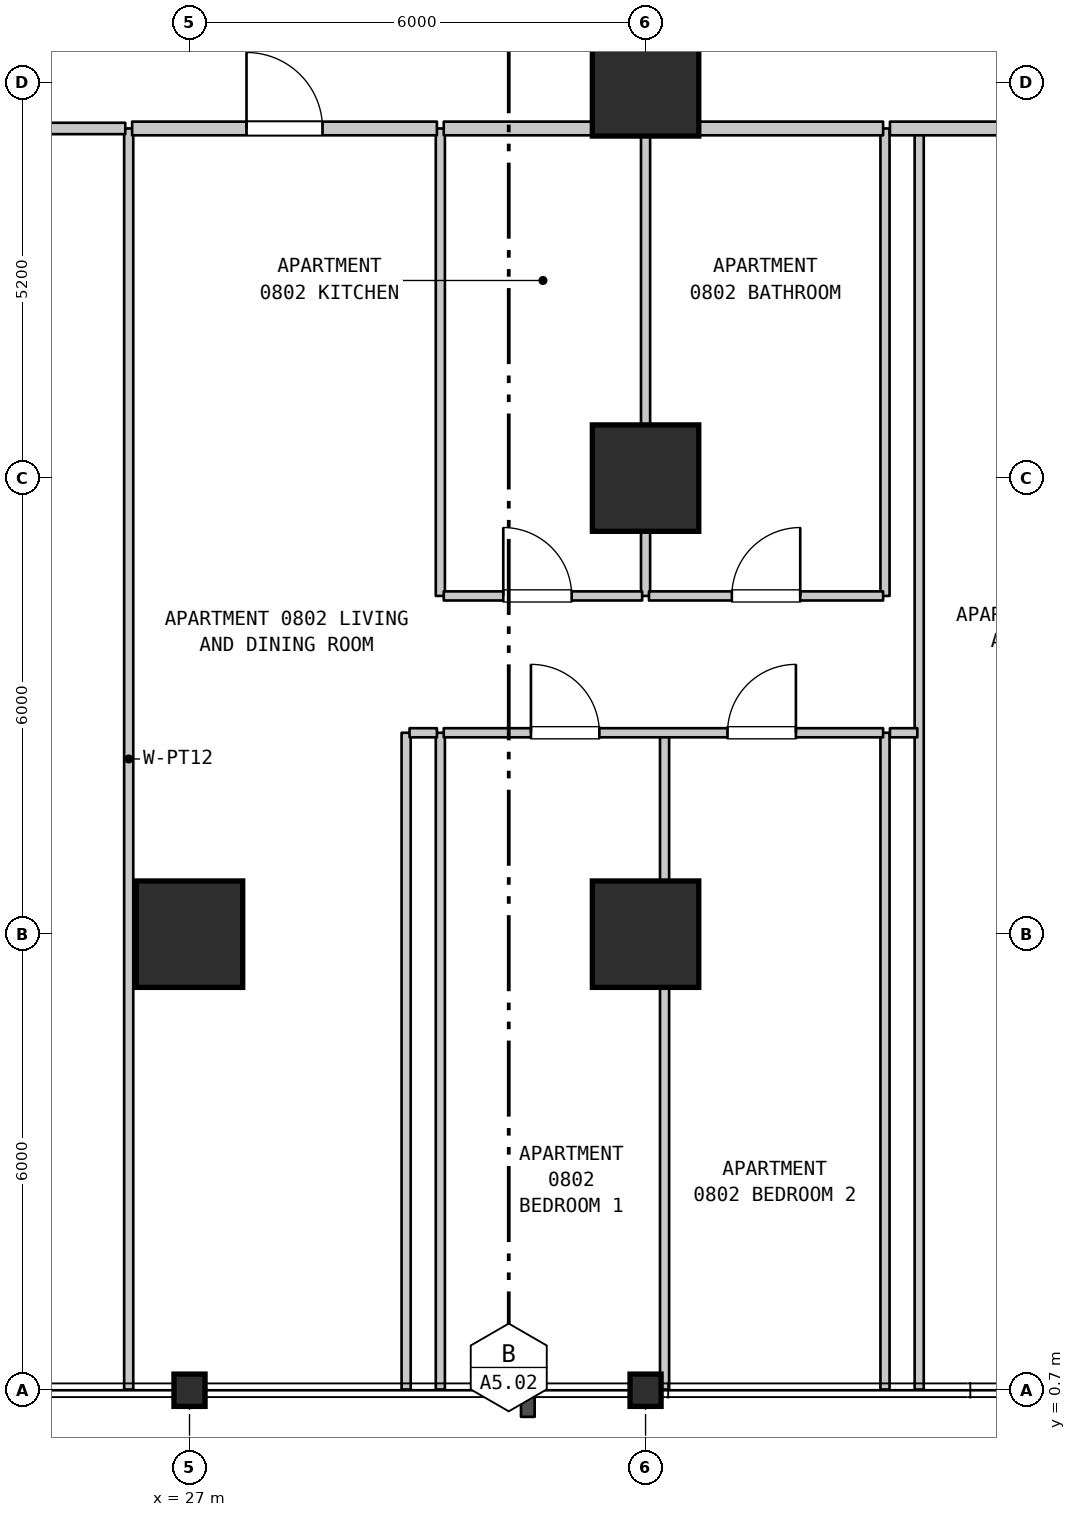
"""IFC4 building model, lengths in metres.
Left out: names, types, materials, properties, quantities, classifications, styles, units other than length and angle.
Written with IfcOpenShell. Run it as: python <this file> out.ifc"""

import sys

from ifc_helpers import new_model, si_unit, direction, frame, frame_2d, origin, origin_2d, place, context, subcontext, project, spatial, rectangle, i_section, extrude, element, fill, save


model = new_model("IFC4")
c1 = context("Model", 3, precision=1e-05, world=origin(), true_north=direction((0.0, 1.0)))
c2 = subcontext(c1, "Body", "Model", "MODEL_VIEW")
j1 = project(units=[si_unit("LENGTHUNIT", "METRE"), si_unit("PLANEANGLEUNIT", "RADIAN")], contexts=[c1])
p1 = place(None, origin())
s1 = spatial("IfcSite", under=j1, at=p1, CompositionType="ELEMENT")
p2 = place(p1, origin())
s2 = spatial("IfcBuilding", under=s1, at=p2, CompositionType="ELEMENT")
p3 = place(p2, frame((0.0, 0.0, 38.8)))
s3 = spatial("IfcBuildingStorey", under=s2, at=p3, CompositionType="ELEMENT", Elevation=38.8)
p4 = place(p3, frame((27.0, 0.7, 0.0), z_axis=(0.0, 0.0, 1.0), x_axis=(1.0, 0.0, 0.0)))
e1 = element("IfcColumn", 1, at=p4, inside=s3, PredefinedType="COLUMN", context=c2, shape_type="SweptSolid", body=[
    extrude(i_section(OverallWidth=0.409, OverallDepth=0.425, WebThickness=0.032, FlangeThickness=0.052, FilletRadius=0.015, at=origin_2d()), origin(), (0.0, 0.0, 1.0), 3.7),
])
p5 = place(p3, frame((27.0, 6.7, 0.0), z_axis=(0.0, 0.0, 1.0), x_axis=(1.0, 0.0, 0.0)))
e2 = element("IfcColumn", 2, at=p5, inside=s3, PredefinedType="COLUMN", context=c2, shape_type="SweptSolid", body=[
    extrude(rectangle(XDim=1.4, YDim=1.4, at=origin_2d()), origin(), (0.0, 0.0, 1.0), 3.7),
])
p6 = place(p3, frame((33.0, 0.7, 0.0), z_axis=(0.0, 0.0, 1.0), x_axis=(1.0, 0.0, 0.0)))
e3 = element("IfcColumn", 3, at=p6, inside=s3, PredefinedType="COLUMN", context=c2, shape_type="SweptSolid", body=[
    extrude(i_section(OverallWidth=0.409, OverallDepth=0.425, WebThickness=0.032, FlangeThickness=0.052, FilletRadius=0.015, at=origin_2d()), origin(), (0.0, 0.0, 1.0), 3.7),
])
for number, where, z_axis, x_axis in (
    (4, (33.0, 6.7, 0.0), (0.0, 0.0, 1.0), (1.0, 0.0, 0.0)),
    (5, (33.0, 12.7, 0.0), (0.0, 0.0, 1.0), (1.0, 0.0, 0.0)),
    (6, (33.0, 17.9, 0.0), (0.0, 0.0, 1.0), (1.0, 0.0, 0.0)),
):
    element("IfcColumn", number, at=place(p3, frame(where, z_axis=z_axis, x_axis=x_axis)), inside=s3, PredefinedType="COLUMN", context=c2, shape_type="SweptSolid", body=[
        extrude(rectangle(XDim=1.4, YDim=1.4, at=origin_2d()), origin(), (0.0, 0.0, 1.0), 3.7),
    ])
p7 = place(p3, frame((26.2, 0.71, 0.0), z_axis=(0.0, 0.0, 1.0), x_axis=(0.0, 1.0, 0.0)))
e7 = element("IfcWall", 7, at=p7, inside=s3, PredefinedType="PARTITIONING", context=c2, shape_type="SweptSolid", body=[
    extrude(rectangle(XDim=16.59, YDim=0.12, at=frame_2d((8.295, 0.0))), origin(), (0.0, 0.0, 1.0), 3.385),
])
for number, where, z_axis, x_axis in (
    (8, (29.85, 0.71, 0.0), (0.0, 0.0, 1.0), (0.0, 1.0, 0.0)),
    (9, (30.3, 0.71, 0.0), (0.0, 0.0, 1.0), (0.0, 1.0, 0.0)),
):
    element("IfcWall", number, at=place(p3, frame(where, z_axis=z_axis, x_axis=x_axis)), inside=s3, PredefinedType="PARTITIONING", context=c2, shape_type="SweptSolid", body=[
        extrude(rectangle(XDim=8.64, YDim=0.12, at=frame_2d((4.32, 0.0))), origin(), (0.0, 0.0, 1.0), 3.385),
    ])
p8 = place(p3, frame((30.3, 11.15, 0.0), z_axis=(0.0, 0.0, 1.0), x_axis=(0.0, 1.0, 0.0)))
e10 = element("IfcWall", 10, at=p8, inside=s3, PredefinedType="PARTITIONING", context=c2, shape_type="SweptSolid", body=[
    extrude(rectangle(XDim=6.15, YDim=0.12, at=frame_2d((3.075, 0.0))), origin(), (0.0, 0.0, 1.0), 3.385),
])
p9 = place(p3, frame((33.0, 11.15, 0.0), z_axis=(0.0, 0.0, 1.0), x_axis=(0.0, 1.0, 0.0)))
e11 = element("IfcWall", 11, at=p9, inside=s3, PredefinedType="PARTITIONING", context=c2, shape_type="SweptSolid", body=[
    extrude(rectangle(XDim=6.15, YDim=0.12, at=frame_2d((3.075, 0.0))), origin(), (0.0, 0.0, 1.0), 2.885),
])
for number, where, z_axis, x_axis in (
    (12, (33.25, 0.71, 0.0), (0.0, 0.0, 1.0), (0.0, 1.0, 0.0)),
    (13, (36.15, 0.71, 0.0), (0.0, 0.0, 1.0), (0.0, 1.0, 0.0)),
):
    element("IfcWall", number, at=place(p3, frame(where, z_axis=z_axis, x_axis=x_axis)), inside=s3, PredefinedType="PARTITIONING", context=c2, shape_type="SweptSolid", body=[
        extrude(rectangle(XDim=8.64, YDim=0.12, at=frame_2d((4.32, 0.0))), origin(), (0.0, 0.0, 1.0), 3.385),
    ])
p10 = place(p3, frame((36.15, 11.15, 0.0), z_axis=(0.0, 0.0, 1.0), x_axis=(0.0, 1.0, 0.0)))
e14 = element("IfcWall", 14, at=p10, inside=s3, PredefinedType="PARTITIONING", context=c2, shape_type="SweptSolid", body=[
    extrude(rectangle(XDim=6.15, YDim=0.12, at=frame_2d((3.075, 0.0))), origin(), (0.0, 0.0, 1.0), 3.385),
])
p11 = place(p3, frame((36.6, 0.71, 0.0), z_axis=(0.0, 0.0, 1.0), x_axis=(0.0, 1.0, 0.0)))
e15 = element("IfcWall", 15, at=p11, inside=s3, PredefinedType="PARTITIONING", context=c2, shape_type="SweptSolid", body=[
    extrude(rectangle(XDim=16.59, YDim=0.12, at=frame_2d((8.295, 0.0))), origin(), (0.0, 0.0, 1.0), 3.385),
])
p12 = place(p3, frame((29.895, 9.35, 0.0), z_axis=(0.0, 0.0, 1.0), x_axis=(1.0, 0.0, 0.0)))
e16 = element("IfcWall", 16, at=p12, inside=s3, PredefinedType="PARTITIONING", context=c2, shape_type="SweptSolid", body=[
    extrude(rectangle(XDim=0.36, YDim=0.12, at=frame_2d((0.18, 0.0))), origin(), (0.0, 0.0, 1.0), 3.385),
])
p13 = place(p3, frame((30.345, 9.35, 0.0), z_axis=(0.0, 0.0, 1.0), x_axis=(1.0, 0.0, 0.0)))
e17 = element("IfcWall", 17, at=p13, inside=s3, PredefinedType="PARTITIONING", context=c2, shape_type="SweptSolid", body=[
    extrude(rectangle(XDim=5.78, YDim=0.12, at=frame_2d((2.89, 0.0))), origin(), (0.0, 0.0, 1.0), 3.385),
])
p14 = place(p13, frame((1.147, 0.0, 0.0)))
e18 = element("IfcOpeningElement", 18, at=p14, cuts=e17, PredefinedType="OPENING", context=c2, shape_type="SweptSolid", body=[
    extrude(rectangle(XDim=0.9, YDim=2.15, at=frame_2d((0.45, 1.075))), frame((0.0, 0.07, 0.0), z_axis=(0.0, -1.0, 0.0), x_axis=(1.0, 0.0, 0.0)), (0.0, 0.0, 1.0), 0.14),
])
p15 = place(p13, frame((3.733, 0.0, 0.0)))
e19 = element("IfcOpeningElement", 19, at=p15, cuts=e17, PredefinedType="OPENING", context=c2, shape_type="SweptSolid", body=[
    extrude(rectangle(XDim=0.9, YDim=2.15, at=frame_2d((0.45, 1.075))), frame((0.0, 0.07, 0.0), z_axis=(0.0, -1.0, 0.0), x_axis=(1.0, 0.0, 0.0)), (0.0, 0.0, 1.0), 0.14),
])
p16 = place(p3, frame((36.215, 9.35, 0.0), z_axis=(0.0, 0.0, 1.0), x_axis=(1.0, 0.0, 0.0)))
e20 = element("IfcWall", 20, at=p16, inside=s3, PredefinedType="PARTITIONING", context=c2, shape_type="SweptSolid", body=[
    extrude(rectangle(XDim=0.36, YDim=0.12, at=frame_2d((0.18, 0.0))), origin(), (0.0, 0.0, 1.0), 3.385),
])
p17 = place(p3, frame((30.345, 11.15, 0.0), z_axis=(0.0, 0.0, 1.0), x_axis=(1.0, 0.0, 0.0)))
e21 = element("IfcWall", 21, at=p17, inside=s3, PredefinedType="PARTITIONING", context=c2, shape_type="SweptSolid", body=[
    extrude(rectangle(XDim=2.61, YDim=0.12, at=frame_2d((1.305, 0.0))), origin(), (0.0, 0.0, 1.0), 3.385),
])
p18 = place(p17, frame((0.783, 0.0, 0.0)))
e22 = element("IfcOpeningElement", 22, at=p18, cuts=e21, PredefinedType="OPENING", context=c2, shape_type="SweptSolid", body=[
    extrude(rectangle(XDim=0.9, YDim=2.15, at=frame_2d((0.45, 1.075))), frame((0.0, 0.07, 0.0), z_axis=(0.0, -1.0, 0.0), x_axis=(1.0, 0.0, 0.0)), (0.0, 0.0, 1.0), 0.14),
])
p19 = place(p3, frame((33.045, 11.15, 0.0), z_axis=(0.0, 0.0, 1.0), x_axis=(1.0, 0.0, 0.0)))
e23 = element("IfcWall", 23, at=p19, inside=s3, PredefinedType="PARTITIONING", context=c2, shape_type="SweptSolid", body=[
    extrude(rectangle(XDim=3.08, YDim=0.12, at=frame_2d((1.54, 0.0))), origin(), (0.0, 0.0, 1.0), 3.385),
])
p20 = place(p19, frame((1.09, 0.0, 0.0)))
e24 = element("IfcOpeningElement", 24, at=p20, cuts=e23, PredefinedType="OPENING", context=c2, shape_type="SweptSolid", body=[
    extrude(rectangle(XDim=0.9, YDim=2.1, at=frame_2d((0.45, 1.05))), frame((0.0, 0.07, 0.0), z_axis=(0.0, -1.0, 0.0), x_axis=(1.0, 0.0, 0.0)), (0.0, 0.0, 1.0), 0.14),
])
p21 = place(p3, frame((21.245, 17.3, 0.0), z_axis=(0.0, 0.0, 1.0), x_axis=(1.0, 0.0, 0.0)))
e25 = element("IfcWall", 25, at=p21, inside=s3, PredefinedType="STANDARD", context=c2, shape_type="SweptSolid", body=[
    extrude(rectangle(XDim=4.91, YDim=0.15, at=frame_2d((2.455, 0.0))), origin(), (0.0, 0.0, 1.0), 3.385),
])
p22 = place(p21, frame((1.884, 0.0, 0.0)))
e26 = element("IfcOpeningElement", 26, at=p22, cuts=e25, PredefinedType="OPENING", context=c2, shape_type="SweptSolid", body=[
    extrude(rectangle(XDim=1.0, YDim=2.15, at=frame_2d((0.5, 1.075))), frame((0.0, 0.085, 0.0), z_axis=(0.0, -1.0, 0.0), x_axis=(1.0, 0.0, 0.0)), (0.0, 0.0, 1.0), 0.17),
])
p23 = place(p3, frame((26.245, 17.3, 0.0), z_axis=(0.0, 0.0, 1.0), x_axis=(1.0, 0.0, 0.0)))
e27 = element("IfcWall", 27, at=p23, inside=s3, PredefinedType="STANDARD", context=c2, shape_type="SweptSolid", body=[
    extrude(rectangle(XDim=4.01, YDim=0.18, at=frame_2d((2.005, 0.0))), origin(), (0.0, 0.0, 1.0), 3.385),
])
p24 = place(p23, frame((1.505, 0.0, 0.0)))
e28 = element("IfcOpeningElement", 28, at=p24, cuts=e27, PredefinedType="OPENING", context=c2, shape_type="SweptSolid", body=[
    extrude(rectangle(XDim=1.0, YDim=2.15, at=frame_2d((0.5, 1.075))), frame((0.0, 0.1, 0.0), z_axis=(0.0, -1.0, 0.0), x_axis=(1.0, 0.0, 0.0)), (0.0, 0.0, 1.0), 0.2),
])
p25 = place(p3, frame((30.345, 17.3, 0.0), z_axis=(0.0, 0.0, 1.0), x_axis=(1.0, 0.0, 0.0)))
e29 = element("IfcWall", 29, at=p25, inside=s3, PredefinedType="STANDARD", context=c2, shape_type="SweptSolid", body=[
    extrude(rectangle(XDim=2.61, YDim=0.18, at=frame_2d((1.305, 0.0))), origin(), (0.0, 0.0, 1.0), 3.385),
])
p26 = place(p3, frame((33.045, 17.3, 0.0), z_axis=(0.0, 0.0, 1.0), x_axis=(1.0, 0.0, 0.0)))
e30 = element("IfcWall", 30, at=p26, inside=s3, PredefinedType="STANDARD", context=c2, shape_type="SweptSolid", body=[
    extrude(rectangle(XDim=3.08, YDim=0.18, at=frame_2d((1.54, 0.0))), origin(), (0.0, 0.0, 1.0), 3.385),
])
p27 = place(p3, frame((36.215, 17.3, 0.0), z_axis=(0.0, 0.0, 1.0), x_axis=(1.0, 0.0, 0.0)))
e31 = element("IfcWall", 31, at=p27, inside=s3, PredefinedType="STANDARD", context=c2, shape_type="SweptSolid", body=[
    extrude(rectangle(XDim=4.5, YDim=0.18, at=frame_2d((2.25, 0.0))), origin(), (0.0, 0.0, 1.0), 3.385),
])
p28 = place(p27, frame((1.879, 0.0, 0.0)))
e32 = element("IfcOpeningElement", 32, at=p28, cuts=e31, PredefinedType="OPENING", context=c2, shape_type="SweptSolid", body=[
    extrude(rectangle(XDim=1.0, YDim=2.15, at=frame_2d((0.5, 1.075))), frame((0.0, 0.1, 0.0), z_axis=(0.0, -1.0, 0.0), x_axis=(1.0, 0.0, 0.0)), (0.0, 0.0, 1.0), 0.2),
])
p29 = place(p14, origin())
e33 = element("IfcDoor", 33, at=p29, inside=s3, OperationType="SINGLE_SWING_LEFT", PredefinedType="DOOR", context=c2, shape_type="SweptSolid", body=[
    extrude(rectangle(XDim=0.9, YDim=2.15, at=frame_2d((0.45, 1.075))), frame((0.0, 0.025, 0.0), z_axis=(0.0, -1.0, 0.0), x_axis=(1.0, 0.0, 0.0)), (0.0, 0.0, 1.0), 0.05),
])
fill(e18, e33)
p30 = place(p15, origin())
e34 = element("IfcDoor", 34, at=p30, inside=s3, OperationType="SINGLE_SWING_RIGHT", PredefinedType="DOOR", context=c2, shape_type="SweptSolid", body=[
    extrude(rectangle(XDim=0.9, YDim=2.15, at=frame_2d((0.45, 1.075))), frame((0.0, 0.025, 0.0), z_axis=(0.0, -1.0, 0.0), x_axis=(1.0, 0.0, 0.0)), (0.0, 0.0, 1.0), 0.05),
])
fill(e19, e34)
p31 = place(p18, origin())
e35 = element("IfcDoor", 35, at=p31, inside=s3, OperationType="SINGLE_SWING_LEFT", PredefinedType="DOOR", context=c2, shape_type="SweptSolid", body=[
    extrude(rectangle(XDim=0.9, YDim=2.15, at=frame_2d((0.45, 1.075))), frame((0.0, 0.025, 0.0), z_axis=(0.0, -1.0, 0.0), x_axis=(1.0, 0.0, 0.0)), (0.0, 0.0, 1.0), 0.05),
])
fill(e22, e35)
p32 = place(p20, origin())
e36 = element("IfcDoor", 36, at=p32, inside=s3, OperationType="SINGLE_SWING_RIGHT", PredefinedType="DOOR", context=c2, shape_type="SweptSolid", body=[
    extrude(rectangle(XDim=0.9, YDim=2.1, at=frame_2d((0.45, 1.05))), frame((0.0, 0.025, 0.0), z_axis=(0.0, -1.0, 0.0), x_axis=(1.0, 0.0, 0.0)), (0.0, 0.0, 1.0), 0.05),
])
fill(e24, e36)
p33 = place(p24, origin())
e37 = element("IfcDoor", 37, at=p33, inside=s3, OperationType="SINGLE_SWING_LEFT", PredefinedType="DOOR", context=c2, shape_type="SweptSolid", body=[
    extrude(rectangle(XDim=1.0, YDim=2.15, at=frame_2d((0.5, 1.075))), frame((0.0, 0.025, 0.0), z_axis=(0.0, -1.0, 0.0), x_axis=(1.0, 0.0, 0.0)), (0.0, 0.0, 1.0), 0.05),
])
fill(e28, e37)
save(model, sys.argv[1])
